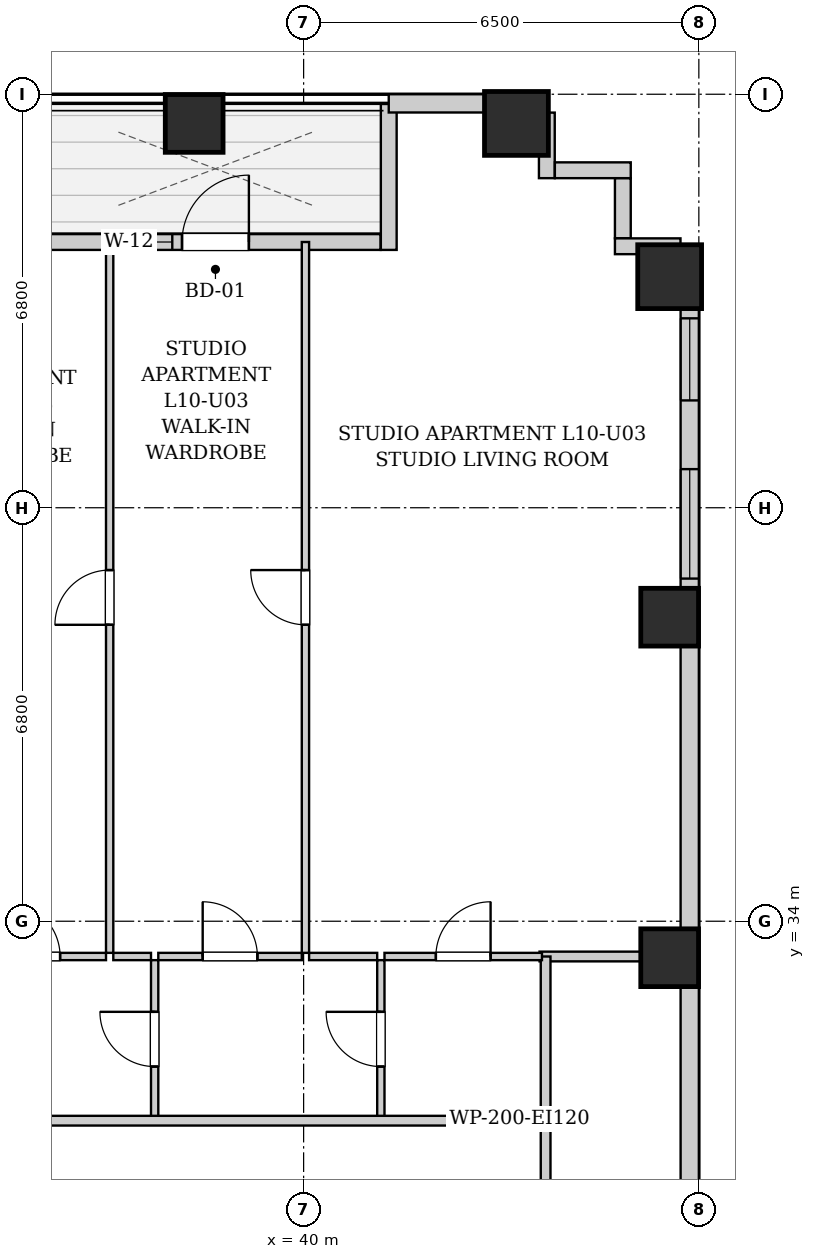
"""IFC4 building model, lengths in metres.
Left out: names, types, materials, properties, quantities, classifications, styles, units other than length and angle.
Written with IfcOpenShell. Run it as: python <this file> out.ifc"""

import sys

from ifc_helpers import new_model, si_unit, direction, frame, frame_2d, origin, origin_2d, place, context, subcontext, project, spatial, rectangle, extrude, element, fill, save


model = new_model("IFC4")
c1 = context("Model", 3, precision=1e-05, world=origin(), true_north=direction((0.0, 1.0)))
c2 = subcontext(c1, "Body", "Model", "MODEL_VIEW")
j1 = project(units=[si_unit("LENGTHUNIT", "METRE"), si_unit("PLANEANGLEUNIT", "RADIAN")], contexts=[c1])
p1 = place(None, origin())
s1 = spatial("IfcSite", under=j1, at=p1, CompositionType="ELEMENT")
p2 = place(p1, origin())
s2 = spatial("IfcBuilding", under=s1, at=p2, CompositionType="ELEMENT")
p3 = place(p2, frame((0.0, 0.0, 41.8)))
s3 = spatial("IfcBuildingStorey", under=s2, at=p3, CompositionType="ELEMENT", Elevation=41.8)
p4 = place(p3, frame((38.2, 47.12, 0.0), z_axis=(0.0, 0.0, 1.0), x_axis=(1.0, 0.0, 0.0)))
e1 = element("IfcColumn", 1, at=p4, inside=s3, PredefinedType="COLUMN", context=c2, shape_type="SweptSolid", body=[
    extrude(rectangle(XDim=0.95, YDim=0.95, at=origin_2d()), origin(), (0.0, 0.0, 1.0), 3.2),
])
p5 = place(p3, frame((43.5, 47.12, 0.0), z_axis=(0.0, 0.0, 1.0), x_axis=(1.0, 0.0, 0.0)))
e2 = element("IfcColumn", 2, at=p5, inside=s3, PredefinedType="COLUMN", context=c2, shape_type="SweptSolid", body=[
    extrude(rectangle(XDim=1.05, YDim=1.05, at=origin_2d()), origin(), (0.0, 0.0, 1.0), 3.2),
])
for number, where, z_axis, x_axis in (
    (3, (46.02, 33.4, 0.0), (0.0, 0.0, 1.0), (1.0, 0.0, 0.0)),
    (4, (46.02, 39.0, 0.0), (0.0, 0.0, 1.0), (1.0, 0.0, 0.0)),
):
    element("IfcColumn", number, at=place(p3, frame(where, z_axis=z_axis, x_axis=x_axis)), inside=s3, PredefinedType="COLUMN", context=c2, shape_type="SweptSolid", body=[
        extrude(rectangle(XDim=0.95, YDim=0.95, at=origin_2d()), origin(), (0.0, 0.0, 1.0), 3.2),
    ])
p6 = place(p3, frame((46.02, 44.6, 0.0), z_axis=(0.0, 0.0, 1.0), x_axis=(1.0, 0.0, 0.0)))
e5 = element("IfcColumn", 5, at=p6, inside=s3, PredefinedType="COLUMN", context=c2, shape_type="SweptSolid", body=[
    extrude(rectangle(XDim=1.05, YDim=1.05, at=origin_2d()), origin(), (0.0, 0.0, 1.0), 3.2),
])
p7 = place(p3, frame((35.834, 45.17, 0.0), z_axis=(0.0, 0.0, 1.0), x_axis=(1.0, 0.0, 0.0)))
e6 = element("IfcWall", 6, at=p7, inside=s3, PredefinedType="SOLIDWALL", context=c2, shape_type="SweptSolid", body=[
    extrude(rectangle(XDim=5.432, YDim=0.26, at=frame_2d((2.716, 0.0))), origin(), (0.0, 0.0, 1.0), 2.94),
])
p8 = place(p7, frame((2.166, 0.0, 0.0)))
e7 = element("IfcOpeningElement", 7, at=p8, cuts=e6, PredefinedType="OPENING", context=c2, shape_type="SweptSolid", body=[
    extrude(rectangle(XDim=1.1, YDim=2.0, at=frame_2d((0.55, 1.0))), frame((0.0, 0.14, 0.0), z_axis=(0.0, -1.0, 0.0), x_axis=(1.0, 0.0, 0.0)), (0.0, 0.0, 1.0), 0.28),
])
p9 = place(p7, frame((1.326, 0.0, 0.55)))
e8 = element("IfcOpeningElement", 8, at=p9, cuts=e6, PredefinedType="OPENING", context=c2, shape_type="SweptSolid", body=[
    extrude(rectangle(XDim=0.68, YDim=1.2, at=frame_2d((0.34, 0.6))), frame((0.0, 0.14, 0.0), z_axis=(0.0, -1.0, 0.0), x_axis=(1.0, 0.0, 0.0)), (0.0, 0.0, 1.0), 0.28),
])
p10 = place(p3, frame((41.4, 45.04, 0.0), z_axis=(0.0, 0.0, 1.0), x_axis=(0.0, 1.0, 0.0)))
e9 = element("IfcWall", 9, at=p10, inside=s3, PredefinedType="SOLIDWALL", context=c2, shape_type="SweptSolid", body=[
    extrude(rectangle(XDim=2.4, YDim=0.26, at=frame_2d((1.2, 0.0))), origin(), (0.0, 0.0, 1.0), 2.94),
])
p11 = place(p3, frame((41.4, 47.45, 0.0), z_axis=(0.0, 0.0, 1.0), x_axis=(1.0, 0.0, 0.0)))
e10 = element("IfcWall", 10, at=p11, inside=s3, PredefinedType="SOLIDWALL", context=c2, shape_type="SweptSolid", body=[
    extrude(rectangle(XDim=2.6, YDim=0.3, at=frame_2d((1.3, 0.0))), origin(), (0.0, 0.0, 1.0), 1.975),
])
p12 = place(p3, frame((46.35, 45.1, 0.0), z_axis=(0.0, 0.0, 1.0), x_axis=(0.0, -1.0, 0.0)))
e11 = element("IfcWall", 11, at=p12, inside=s3, PredefinedType="SOLIDWALL", context=c2, shape_type="SweptSolid", body=[
    extrude(rectangle(XDim=42.6, YDim=0.3, at=frame_2d((21.3, 0.0))), origin(), (0.0, 0.0, 1.0), 1.975),
])
p13 = place(p12, frame((37.575, 0.0, 0.55)))
e12 = element("IfcOpeningElement", 12, at=p13, cuts=e11, PredefinedType="OPENING", context=c2, shape_type="SweptSolid", body=[
    extrude(rectangle(XDim=1.8, YDim=1.2, at=frame_2d((0.9, 0.6))), frame((0.0, 0.16, 0.0), z_axis=(0.0, -1.0, 0.0), x_axis=(1.0, 0.0, 0.0)), (0.0, 0.0, 1.0), 0.32),
])
p14 = place(p12, frame((34.85, 0.0, 0.55)))
e13 = element("IfcOpeningElement", 13, at=p14, cuts=e11, PredefinedType="OPENING", context=c2, shape_type="SweptSolid", body=[
    extrude(rectangle(XDim=1.35, YDim=1.2, at=frame_2d((0.675, 0.6))), frame((0.0, 0.16, 0.0), z_axis=(0.0, -1.0, 0.0), x_axis=(1.0, 0.0, 0.0)), (0.0, 0.0, 1.0), 0.32),
])
p15 = place(p12, frame((3.665, 0.0, 0.55)))
e14 = element("IfcOpeningElement", 14, at=p15, cuts=e11, PredefinedType="OPENING", context=c2, shape_type="SweptSolid", body=[
    extrude(rectangle(XDim=1.8, YDim=1.2, at=frame_2d((0.9, 0.6))), frame((0.0, 0.16, 0.0), z_axis=(0.0, -1.0, 0.0), x_axis=(1.0, 0.0, 0.0)), (0.0, 0.0, 1.0), 0.32),
])
p16 = place(p12, frame((1.185, 0.0, 0.55)))
e15 = element("IfcOpeningElement", 15, at=p16, cuts=e11, PredefinedType="OPENING", context=c2, shape_type="SweptSolid", body=[
    extrude(rectangle(XDim=1.35, YDim=1.2, at=frame_2d((0.675, 0.6))), frame((0.0, 0.16, 0.0), z_axis=(0.0, -1.0, 0.0), x_axis=(1.0, 0.0, 0.0)), (0.0, 0.0, 1.0), 0.32),
])
p17 = place(p12, frame((27.225, 0.0, 0.55)))
e16 = element("IfcOpeningElement", 16, at=p17, cuts=e11, PredefinedType="OPENING", context=c2, shape_type="SweptSolid", body=[
    extrude(rectangle(XDim=1.8, YDim=1.2, at=frame_2d((0.9, 0.6))), frame((0.0, 0.16, 0.0), z_axis=(0.0, -1.0, 0.0), x_axis=(1.0, 0.0, 0.0)), (0.0, 0.0, 1.0), 0.32),
])
p18 = place(p12, frame((17.1, 0.0, 0.55)))
e17 = element("IfcOpeningElement", 17, at=p18, cuts=e11, PredefinedType="OPENING", context=c2, shape_type="SweptSolid", body=[
    extrude(rectangle(XDim=1.8, YDim=1.2, at=frame_2d((0.9, 0.6))), frame((0.0, 0.16, 0.0), z_axis=(0.0, -1.0, 0.0), x_axis=(1.0, 0.0, 0.0)), (0.0, 0.0, 1.0), 0.32),
])
p19 = place(p3, frame((44.0, 47.298, 0.0), z_axis=(0.0, 0.0, 1.0), x_axis=(0.0, -1.0, 0.0)))
e18 = element("IfcWall", 18, at=p19, inside=s3, PredefinedType="SOLIDWALL", context=c2, shape_type="SweptSolid", body=[
    extrude(rectangle(XDim=1.078, YDim=0.26, at=frame_2d((0.539, 0.0))), origin(), (0.0, 0.0, 1.0), 2.94),
])
p20 = place(p3, frame((44.132, 46.35, 0.0), z_axis=(0.0, 0.0, 1.0), x_axis=(1.0, 0.0, 0.0)))
e19 = element("IfcWall", 19, at=p20, inside=s3, PredefinedType="SOLIDWALL", context=c2, shape_type="SweptSolid", body=[
    extrude(rectangle(XDim=1.248, YDim=0.26, at=frame_2d((0.624, 0.0))), origin(), (0.0, 0.0, 1.0), 2.94),
])
p21 = place(p3, frame((45.25, 46.218, 0.0), z_axis=(0.0, 0.0, 1.0), x_axis=(0.0, -1.0, 0.0)))
e20 = element("IfcWall", 20, at=p21, inside=s3, PredefinedType="SOLIDWALL", context=c2, shape_type="SweptSolid", body=[
    extrude(rectangle(XDim=0.986, YDim=0.26, at=frame_2d((0.493, 0.0))), origin(), (0.0, 0.0, 1.0), 2.94),
])
p22 = place(p3, frame((45.12, 45.1, 0.0), z_axis=(0.0, 0.0, 1.0), x_axis=(1.0, 0.0, 0.0)))
e21 = element("IfcWall", 21, at=p22, inside=s3, PredefinedType="SOLIDWALL", context=c2, shape_type="SweptSolid", body=[
    extrude(rectangle(XDim=1.078, YDim=0.26, at=frame_2d((0.539, 0.0))), origin(), (0.0, 0.0, 1.0), 2.94),
])
p23 = place(p3, frame((43.98, 28.98, 0.0), z_axis=(0.0, 0.0, 1.0), x_axis=(0.0, 1.0, 0.0)))
e22 = element("IfcWall", 22, at=p23, inside=s3, PredefinedType="PARTITIONING", context=c2, shape_type="SweptSolid", body=[
    extrude(rectangle(XDim=1.74, YDim=0.16, at=frame_2d((0.87, 0.0))), origin(), (0.0, 0.0, 1.0), 2.94),
])
p24 = place(p3, frame((43.88, 33.42, 0.0), z_axis=(0.0, 0.0, 1.0), x_axis=(1.0, 0.0, 0.0)))
e23 = element("IfcWall", 23, at=p24, inside=s3, PredefinedType="PARTITIONING", context=c2, shape_type="SweptSolid", body=[
    extrude(rectangle(XDim=2.34, YDim=0.16, at=frame_2d((1.17, 0.0))), origin(), (0.0, 0.0, 1.0), 2.94),
])
p25 = place(p3, frame((43.98, 30.76, 0.0), z_axis=(0.0, 0.0, 1.0), x_axis=(0.0, 1.0, 0.0)))
e24 = element("IfcWall", 24, at=p25, inside=s3, PredefinedType="PARTITIONING", context=c2, shape_type="SweptSolid", body=[
    extrude(rectangle(XDim=2.66, YDim=0.16, at=frame_2d((1.33, 0.0))), origin(), (0.0, 0.0, 1.0), 2.94),
])
p26 = place(p3, frame((37.55, 30.76, 0.0), z_axis=(0.0, 0.0, 1.0), x_axis=(0.0, 1.0, 0.0)))
e25 = element("IfcWall", 25, at=p26, inside=s3, PredefinedType="PARTITIONING", context=c2, shape_type="SweptSolid", body=[
    extrude(rectangle(XDim=2.6, YDim=0.12, at=frame_2d((1.3, 0.0))), origin(), (0.0, 0.0, 1.0), 2.94),
])
p27 = place(p26, frame((0.85, 0.0, 0.0)))
e26 = element("IfcOpeningElement", 26, at=p27, cuts=e25, PredefinedType="OPENING", context=c2, shape_type="SweptSolid", body=[
    extrude(rectangle(XDim=0.9, YDim=2.05, at=frame_2d((0.45, 1.025))), frame((0.0, 0.07, 0.0), z_axis=(0.0, -1.0, 0.0), x_axis=(1.0, 0.0, 0.0)), (0.0, 0.0, 1.0), 0.14),
])
p28 = place(p3, frame((34.34, 33.42, 0.0), z_axis=(0.0, 0.0, 1.0), x_axis=(1.0, 0.0, 0.0)))
e27 = element("IfcWall", 27, at=p28, inside=s3, PredefinedType="PARTITIONING", context=c2, shape_type="SweptSolid", body=[
    extrude(rectangle(XDim=2.41, YDim=0.12, at=frame_2d((1.205, 0.0))), origin(), (0.0, 0.0, 1.0), 2.94),
])
p29 = place(p28, frame((0.755, 0.0, 0.0)))
e28 = element("IfcOpeningElement", 28, at=p29, cuts=e27, PredefinedType="OPENING", context=c2, shape_type="SweptSolid", body=[
    extrude(rectangle(XDim=0.9, YDim=2.05, at=frame_2d((0.45, 1.025))), frame((0.0, 0.07, 0.0), z_axis=(0.0, -1.0, 0.0), x_axis=(1.0, 0.0, 0.0)), (0.0, 0.0, 1.0), 0.14),
])
p30 = place(p3, frame((36.87, 33.42, 0.0), z_axis=(0.0, 0.0, 1.0), x_axis=(1.0, 0.0, 0.0)))
e29 = element("IfcWall", 29, at=p30, inside=s3, PredefinedType="PARTITIONING", context=c2, shape_type="SweptSolid", body=[
    extrude(rectangle(XDim=0.62, YDim=0.12, at=frame_2d((0.31, 0.0))), origin(), (0.0, 0.0, 1.0), 2.94),
])
p31 = place(p3, frame((41.27, 30.76, 0.0), z_axis=(0.0, 0.0, 1.0), x_axis=(0.0, 1.0, 0.0)))
e30 = element("IfcWall", 30, at=p31, inside=s3, PredefinedType="PARTITIONING", context=c2, shape_type="SweptSolid", body=[
    extrude(rectangle(XDim=2.6, YDim=0.12, at=frame_2d((1.3, 0.0))), origin(), (0.0, 0.0, 1.0), 2.94),
])
p32 = place(p31, frame((0.85, 0.0, 0.0)))
e31 = element("IfcOpeningElement", 31, at=p32, cuts=e30, PredefinedType="OPENING", context=c2, shape_type="SweptSolid", body=[
    extrude(rectangle(XDim=0.9, YDim=2.05, at=frame_2d((0.45, 1.025))), frame((0.0, 0.07, 0.0), z_axis=(0.0, -1.0, 0.0), x_axis=(1.0, 0.0, 0.0)), (0.0, 0.0, 1.0), 0.14),
])
p33 = place(p3, frame((37.61, 33.42, 0.0), z_axis=(0.0, 0.0, 1.0), x_axis=(1.0, 0.0, 0.0)))
e32 = element("IfcWall", 32, at=p33, inside=s3, PredefinedType="PARTITIONING", context=c2, shape_type="SweptSolid", body=[
    extrude(rectangle(XDim=2.36, YDim=0.12, at=frame_2d((1.18, 0.0))), origin(), (0.0, 0.0, 1.0), 2.94),
])
p34 = place(p33, frame((0.73, 0.0, 0.0)))
e33 = element("IfcOpeningElement", 33, at=p34, cuts=e32, PredefinedType="OPENING", context=c2, shape_type="SweptSolid", body=[
    extrude(rectangle(XDim=0.9, YDim=2.05, at=frame_2d((0.45, 1.025))), frame((0.0, 0.07, 0.0), z_axis=(0.0, -1.0, 0.0), x_axis=(1.0, 0.0, 0.0)), (0.0, 0.0, 1.0), 0.14),
])
p35 = place(p3, frame((40.09, 33.42, 0.0), z_axis=(0.0, 0.0, 1.0), x_axis=(1.0, 0.0, 0.0)))
e34 = element("IfcWall", 34, at=p35, inside=s3, PredefinedType="PARTITIONING", context=c2, shape_type="SweptSolid", body=[
    extrude(rectangle(XDim=1.12, YDim=0.12, at=frame_2d((0.56, 0.0))), origin(), (0.0, 0.0, 1.0), 2.94),
])
p36 = place(p3, frame((41.33, 33.42, 0.0), z_axis=(0.0, 0.0, 1.0), x_axis=(1.0, 0.0, 0.0)))
e35 = element("IfcWall", 35, at=p36, inside=s3, PredefinedType="PARTITIONING", context=c2, shape_type="SweptSolid", body=[
    extrude(rectangle(XDim=2.59, YDim=0.12, at=frame_2d((1.295, 0.0))), origin(), (0.0, 0.0, 1.0), 2.94),
])
p37 = place(p36, frame((0.845, 0.0, 0.0)))
e36 = element("IfcOpeningElement", 36, at=p37, cuts=e35, PredefinedType="OPENING", context=c2, shape_type="SweptSolid", body=[
    extrude(rectangle(XDim=0.9, YDim=2.05, at=frame_2d((0.45, 1.025))), frame((0.0, 0.07, 0.0), z_axis=(0.0, -1.0, 0.0), x_axis=(1.0, 0.0, 0.0)), (0.0, 0.0, 1.0), 0.14),
])
p38 = place(p3, frame((36.81, 33.48, 0.0), z_axis=(0.0, 0.0, 1.0), x_axis=(0.0, 1.0, 0.0)))
e37 = element("IfcWall", 37, at=p38, inside=s3, PredefinedType="PARTITIONING", context=c2, shape_type="SweptSolid", body=[
    extrude(rectangle(XDim=11.69, YDim=0.12, at=frame_2d((5.845, 0.0))), origin(), (0.0, 0.0, 1.0), 2.94),
])
p39 = place(p38, frame((5.395, 0.0, 0.0)))
e38 = element("IfcOpeningElement", 38, at=p39, cuts=e37, PredefinedType="OPENING", context=c2, shape_type="SweptSolid", body=[
    extrude(rectangle(XDim=0.9, YDim=2.05, at=frame_2d((0.45, 1.025))), frame((0.0, 0.07, 0.0), z_axis=(0.0, -1.0, 0.0), x_axis=(1.0, 0.0, 0.0)), (0.0, 0.0, 1.0), 0.14),
])
p40 = place(p3, frame((40.03, 33.48, 0.0), z_axis=(0.0, 0.0, 1.0), x_axis=(0.0, 1.0, 0.0)))
e39 = element("IfcWall", 39, at=p40, inside=s3, PredefinedType="PARTITIONING", context=c2, shape_type="SweptSolid", body=[
    extrude(rectangle(XDim=11.69, YDim=0.12, at=frame_2d((5.845, 0.0))), origin(), (0.0, 0.0, 1.0), 2.94),
])
p41 = place(p40, frame((5.395, 0.0, 0.0)))
e40 = element("IfcOpeningElement", 40, at=p41, cuts=e39, PredefinedType="OPENING", context=c2, shape_type="SweptSolid", body=[
    extrude(rectangle(XDim=0.9, YDim=2.05, at=frame_2d((0.45, 1.025))), frame((0.0, 0.07, 0.0), z_axis=(0.0, -1.0, 0.0), x_axis=(1.0, 0.0, 0.0)), (0.0, 0.0, 1.0), 0.14),
])
p42 = place(p3, frame((10.05, 30.72, 0.0), z_axis=(0.0, 0.0, 1.0), x_axis=(1.0, 0.0, 0.0)))
e41 = element("IfcWall", 41, at=p42, inside=s3, PredefinedType="PARTITIONING", context=c2, shape_type="SweptSolid", body=[
    extrude(rectangle(XDim=33.9, YDim=0.16, at=frame_2d((16.95, 0.0))), origin(), (0.0, 0.0, 1.0), 2.94),
])
p43 = place(p42, frame((4.035, 0.0, 0.0)))
e42 = element("IfcOpeningElement", 42, at=p43, cuts=e41, PredefinedType="OPENING", context=c2, shape_type="SweptSolid", body=[
    extrude(rectangle(XDim=0.95, YDim=2.1, at=frame_2d((0.475, 1.05))), frame((0.0, 0.09, 0.0), z_axis=(0.0, -1.0, 0.0), x_axis=(1.0, 0.0, 0.0)), (0.0, 0.0, 1.0), 0.18),
])
p44 = place(p27, origin())
e43 = element("IfcDoor", 43, at=p44, inside=s3, OperationType="SINGLE_SWING_RIGHT", PredefinedType="DOOR", context=c2, shape_type="SweptSolid", body=[
    extrude(rectangle(XDim=0.9, YDim=2.05, at=frame_2d((0.45, 1.025))), frame((0.0, 0.025, 0.0), z_axis=(0.0, -1.0, 0.0), x_axis=(1.0, 0.0, 0.0)), (0.0, 0.0, 1.0), 0.05),
])
fill(e26, e43)
p45 = place(p29, origin())
e44 = element("IfcDoor", 44, at=p45, inside=s3, OperationType="SINGLE_SWING_LEFT", PredefinedType="DOOR", context=c2, shape_type="SweptSolid", body=[
    extrude(rectangle(XDim=0.9, YDim=2.05, at=frame_2d((0.45, 1.025))), frame((0.0, 0.025, 0.0), z_axis=(0.0, -1.0, 0.0), x_axis=(1.0, 0.0, 0.0)), (0.0, 0.0, 1.0), 0.05),
])
fill(e28, e44)
p46 = place(p32, origin())
e45 = element("IfcDoor", 45, at=p46, inside=s3, OperationType="SINGLE_SWING_RIGHT", PredefinedType="DOOR", context=c2, shape_type="SweptSolid", body=[
    extrude(rectangle(XDim=0.9, YDim=2.05, at=frame_2d((0.45, 1.025))), frame((0.0, 0.025, 0.0), z_axis=(0.0, -1.0, 0.0), x_axis=(1.0, 0.0, 0.0)), (0.0, 0.0, 1.0), 0.05),
])
fill(e31, e45)
p47 = place(p34, origin())
e46 = element("IfcDoor", 46, at=p47, inside=s3, OperationType="SINGLE_SWING_LEFT", PredefinedType="DOOR", context=c2, shape_type="SweptSolid", body=[
    extrude(rectangle(XDim=0.9, YDim=2.05, at=frame_2d((0.45, 1.025))), frame((0.0, 0.025, 0.0), z_axis=(0.0, -1.0, 0.0), x_axis=(1.0, 0.0, 0.0)), (0.0, 0.0, 1.0), 0.05),
])
fill(e33, e46)
p48 = place(p37, origin())
e47 = element("IfcDoor", 47, at=p48, inside=s3, OperationType="SINGLE_SWING_RIGHT", PredefinedType="DOOR", context=c2, shape_type="SweptSolid", body=[
    extrude(rectangle(XDim=0.9, YDim=2.05, at=frame_2d((0.45, 1.025))), frame((0.0, 0.025, 0.0), z_axis=(0.0, -1.0, 0.0), x_axis=(1.0, 0.0, 0.0)), (0.0, 0.0, 1.0), 0.05),
])
fill(e36, e47)
p49 = place(p39, origin())
e48 = element("IfcDoor", 48, at=p49, inside=s3, OperationType="SINGLE_SWING_LEFT", PredefinedType="DOOR", context=c2, shape_type="SweptSolid", body=[
    extrude(rectangle(XDim=0.9, YDim=2.05, at=frame_2d((0.45, 1.025))), frame((0.0, 0.025, 0.0), z_axis=(0.0, -1.0, 0.0), x_axis=(1.0, 0.0, 0.0)), (0.0, 0.0, 1.0), 0.05),
])
fill(e38, e48)
p50 = place(p41, origin())
e49 = element("IfcDoor", 49, at=p50, inside=s3, OperationType="SINGLE_SWING_RIGHT", PredefinedType="DOOR", context=c2, shape_type="SweptSolid", body=[
    extrude(rectangle(XDim=0.9, YDim=2.05, at=frame_2d((0.45, 1.025))), frame((0.0, 0.025, 0.0), z_axis=(0.0, -1.0, 0.0), x_axis=(1.0, 0.0, 0.0)), (0.0, 0.0, 1.0), 0.05),
])
fill(e40, e49)
p51 = place(p8, origin())
e50 = element("IfcDoor", 50, at=p51, inside=s3, OperationType="SINGLE_SWING_RIGHT", PredefinedType="DOOR", context=c2, shape_type="SweptSolid", body=[
    extrude(rectangle(XDim=1.1, YDim=2.0, at=frame_2d((0.55, 1.0))), frame((0.0, 0.025, 0.0), z_axis=(0.0, -1.0, 0.0), x_axis=(1.0, 0.0, 0.0)), (0.0, 0.0, 1.0), 0.05),
])
fill(e7, e50)
p52 = place(p9, origin())
e51 = element("IfcWindow", 51, at=p52, inside=s3, PartitioningType="SINGLE_PANEL", PredefinedType="WINDOW", context=c2, shape_type="SweptSolid", body=[
    extrude(rectangle(XDim=0.68, YDim=1.2, at=frame_2d((0.34, 0.6))), frame((0.0, 0.03, 0.0), z_axis=(0.0, -1.0, 0.0), x_axis=(1.0, 0.0, 0.0)), (0.0, 0.0, 1.0), 0.06),
])
fill(e8, e51)
p53 = place(p15, origin())
e52 = element("IfcWindow", 52, at=p53, inside=s3, PartitioningType="DOUBLE_PANEL_VERTICAL", PredefinedType="WINDOW", context=c2, shape_type="SweptSolid", body=[
    extrude(rectangle(XDim=1.8, YDim=1.2, at=frame_2d((0.9, 0.6))), frame((0.0, 0.03, 0.0), z_axis=(0.0, -1.0, 0.0), x_axis=(1.0, 0.0, 0.0)), (0.0, 0.0, 1.0), 0.06),
])
fill(e14, e52)
p54 = place(p16, origin())
e53 = element("IfcWindow", 53, at=p54, inside=s3, PartitioningType="SINGLE_PANEL", PredefinedType="WINDOW", context=c2, shape_type="SweptSolid", body=[
    extrude(rectangle(XDim=1.35, YDim=1.2, at=frame_2d((0.675, 0.6))), frame((0.0, 0.03, 0.0), z_axis=(0.0, -1.0, 0.0), x_axis=(1.0, 0.0, 0.0)), (0.0, 0.0, 1.0), 0.06),
])
fill(e15, e53)
save(model, sys.argv[1])
